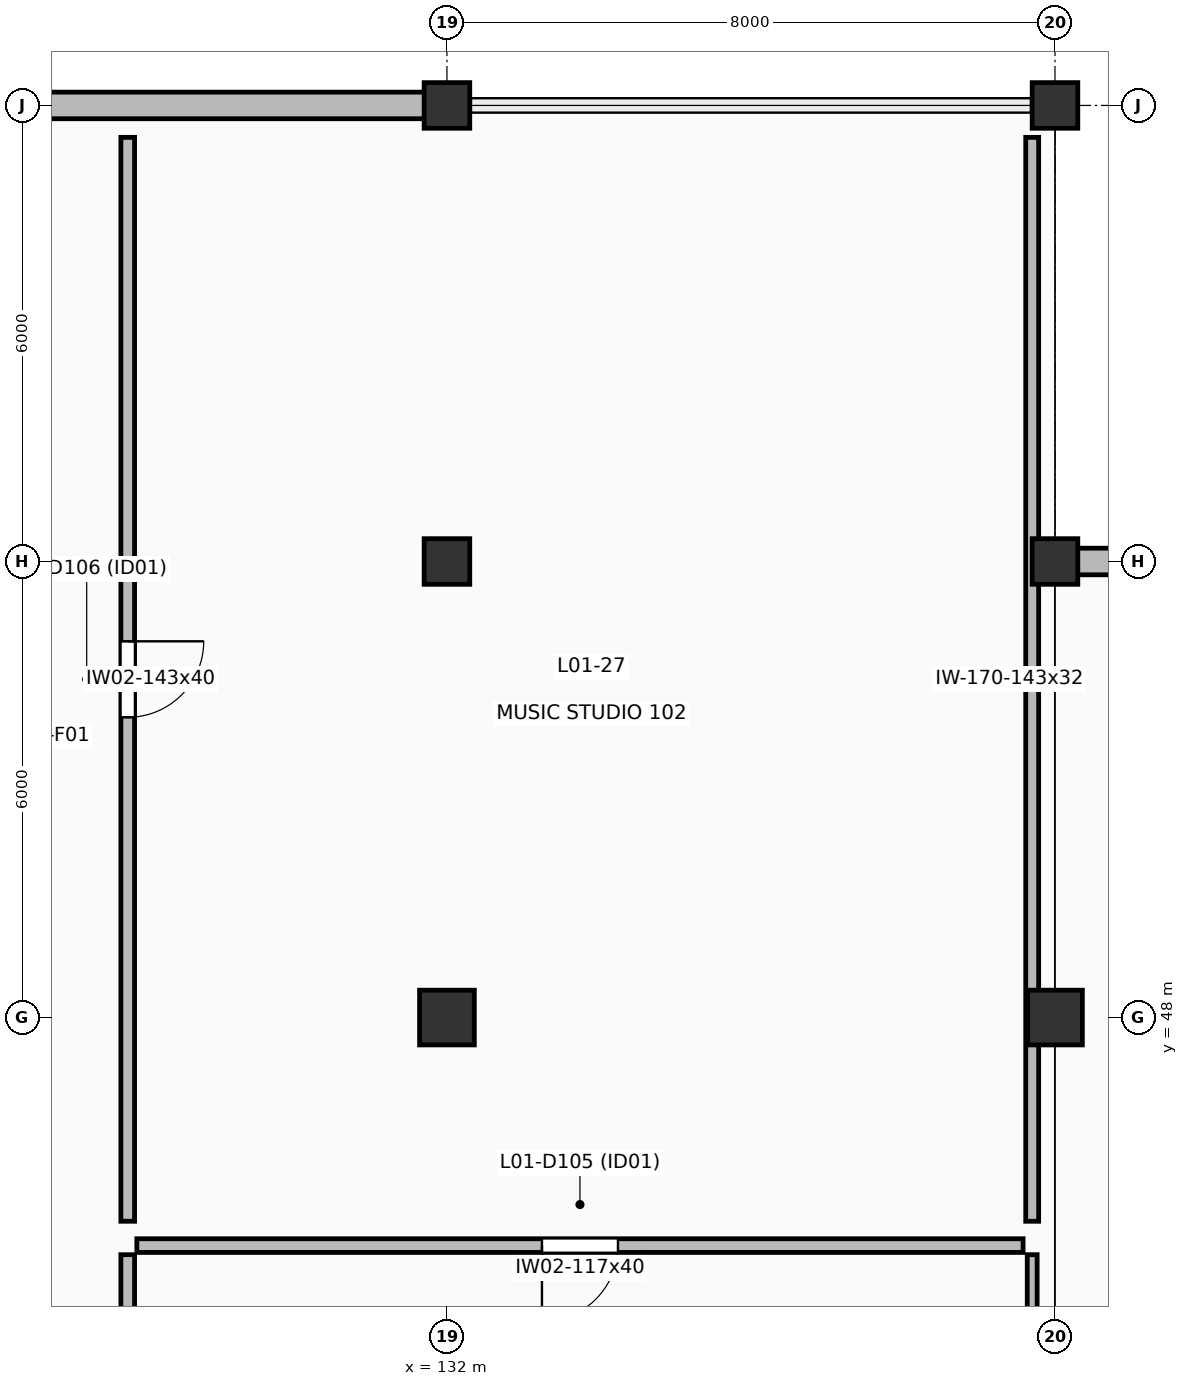
"""IFC4 building model, lengths in metres.
Left out: names, types, materials, properties, quantities, classifications, styles, units other than length and angle.
Written with IfcOpenShell. Run it as: python <this file> out.ifc"""

import sys

from ifc_helpers import new_model, si_unit, direction, frame, frame_2d, origin, origin_2d, place, context, subcontext, project, spatial, rectangle, extrude, element, fill, save


model = new_model("IFC4")
c1 = context("Model", 3, precision=1e-05, world=origin(), true_north=direction((0.0, 1.0)))
c2 = subcontext(c1, "Body", "Model", "MODEL_VIEW")
j1 = project(units=[si_unit("LENGTHUNIT", "METRE"), si_unit("PLANEANGLEUNIT", "RADIAN")], contexts=[c1])
p1 = place(None, origin())
s1 = spatial("IfcSite", under=j1, at=p1, CompositionType="ELEMENT")
p2 = place(p1, origin())
s2 = spatial("IfcBuilding", under=s1, at=p2, CompositionType="ELEMENT")
p3 = place(p2, frame((0.0, 0.0, 5.4)))
s3 = spatial("IfcBuildingStorey", under=s2, at=p3, CompositionType="ELEMENT", Elevation=5.4)
p4 = place(p3, frame((132.0, 48.0, 0.0), z_axis=(0.0, 0.0, 1.0), x_axis=(1.0, 0.0, 0.0)))
e1 = element("IfcColumn", 1, at=p4, inside=s3, PredefinedType="COLUMN", context=c2, shape_type="SweptSolid", body=[
    extrude(rectangle(XDim=0.72, YDim=0.72, at=origin_2d()), origin(), (0.0, 0.0, 1.0), 4.2),
])
for number, where, z_axis, x_axis in (
    (2, (132.0, 54.0, 0.0), (0.0, 0.0, 1.0), (1.0, 0.0, 0.0)),
    (3, (132.0, 60.0, 0.0), (0.0, 0.0, 1.0), (1.0, 0.0, 0.0)),
):
    element("IfcColumn", number, at=place(p3, frame(where, z_axis=z_axis, x_axis=x_axis)), inside=s3, PredefinedType="COLUMN", context=c2, shape_type="SweptSolid", body=[
        extrude(rectangle(XDim=0.6, YDim=0.6, at=origin_2d()), origin(), (0.0, 0.0, 1.0), 4.2),
    ])
p5 = place(p3, frame((140.0, 48.0, 0.0), z_axis=(0.0, 0.0, 1.0), x_axis=(1.0, 0.0, 0.0)))
e4 = element("IfcColumn", 4, at=p5, inside=s3, PredefinedType="COLUMN", context=c2, shape_type="SweptSolid", body=[
    extrude(rectangle(XDim=0.72, YDim=0.72, at=origin_2d()), origin(), (0.0, 0.0, 1.0), 4.2),
])
for number, where, z_axis, x_axis in (
    (5, (140.0, 54.0, 0.0), (0.0, 0.0, 1.0), (1.0, 0.0, 0.0)),
    (6, (140.0, 60.0, 0.0), (0.0, 0.0, 1.0), (1.0, 0.0, 0.0)),
):
    element("IfcColumn", number, at=place(p3, frame(where, z_axis=z_axis, x_axis=x_axis)), inside=s3, PredefinedType="COLUMN", context=c2, shape_type="SweptSolid", body=[
        extrude(rectangle(XDim=0.6, YDim=0.6, at=origin_2d()), origin(), (0.0, 0.0, 1.0), 4.2),
    ])
p6 = place(p3, frame((124.0, 60.0, 0.0), z_axis=(0.0, 0.0, 1.0), x_axis=(1.0, 0.0, 0.0)))
e7 = element("IfcWall", 7, at=p6, inside=s3, PredefinedType="SOLIDWALL", context=c2, shape_type="SweptSolid", body=[
    extrude(rectangle(XDim=8.0, YDim=0.35, at=frame_2d((4.0, 0.0))), origin(), (0.0, 0.0, 1.0), 3.165),
])
p7 = place(p3, frame((140.0, 54.0, 0.0), z_axis=(0.0, 0.0, 1.0), x_axis=(1.0, 0.0, 0.0)))
e8 = element("IfcWall", 8, at=p7, inside=s3, PredefinedType="SOLIDWALL", context=c2, shape_type="SweptSolid", body=[
    extrude(rectangle(XDim=7.0, YDim=0.35, at=frame_2d((3.5, 0.0))), origin(), (0.0, 0.0, 1.0), 3.135),
])
p8 = place(p3, frame((139.58, 45.0, 0.0), z_axis=(0.0, 0.0, 1.0), x_axis=(-1.0, 0.0, 0.0)))
e9 = element("IfcWall", 9, at=p8, inside=s3, PredefinedType="PARTITIONING", context=c2, shape_type="SweptSolid", body=[
    extrude(rectangle(XDim=11.66, YDim=0.18, at=frame_2d((5.83, 0.0))), origin(), (0.0, 0.0, 1.0), 3.98),
])
p9 = place(p8, frame((5.33, 0.0, 0.0)))
e10 = element("IfcOpeningElement", 10, at=p9, cuts=e9, PredefinedType="OPENING", context=c2, shape_type="SweptSolid", body=[
    extrude(rectangle(XDim=1.0, YDim=2.15, at=frame_2d((0.5, 1.075))), frame((0.0, 0.1, 0.0), z_axis=(0.0, -1.0, 0.0), x_axis=(1.0, 0.0, 0.0)), (0.0, 0.0, 1.0), 0.2),
])
p10 = place(p3, frame((127.8, 44.88, 0.0), z_axis=(0.0, 0.0, 1.0), x_axis=(0.0, -1.0, 0.0)))
e11 = element("IfcWall", 11, at=p10, inside=s3, PredefinedType="PARTITIONING", context=c2, shape_type="SweptSolid", body=[
    extrude(rectangle(XDim=14.46, YDim=0.18, at=frame_2d((7.23, 0.0))), origin(), (0.0, 0.0, 1.0), 3.98),
])
p11 = place(p3, frame((139.7, 30.42, 0.0), z_axis=(0.0, 0.0, 1.0), x_axis=(0.0, 1.0, 0.0)))
e12 = element("IfcWall", 12, at=p11, inside=s3, PredefinedType="PARTITIONING", context=c2, shape_type="SweptSolid", body=[
    extrude(rectangle(XDim=14.46, YDim=0.13, at=frame_2d((7.23, 0.0))), origin(), (0.0, 0.0, 1.0), 3.245),
])
p12 = place(p3, frame((127.8, 59.58, 0.0), z_axis=(0.0, 0.0, 1.0), x_axis=(0.0, -1.0, 0.0)))
e13 = element("IfcWall", 13, at=p12, inside=s3, PredefinedType="PARTITIONING", context=c2, shape_type="SweptSolid", body=[
    extrude(rectangle(XDim=14.26, YDim=0.18, at=frame_2d((7.13, 0.0))), origin(), (0.0, 0.0, 1.0), 3.98),
])
p13 = place(p12, frame((6.63, 0.0, 0.0)))
e14 = element("IfcOpeningElement", 14, at=p13, cuts=e13, PredefinedType="OPENING", context=c2, shape_type="SweptSolid", body=[
    extrude(rectangle(XDim=1.0, YDim=2.15, at=frame_2d((0.5, 1.075))), frame((0.0, 0.1, 0.0), z_axis=(0.0, -1.0, 0.0), x_axis=(1.0, 0.0, 0.0)), (0.0, 0.0, 1.0), 0.2),
])
p14 = place(p3, frame((139.7, 45.32, 0.0), z_axis=(0.0, 0.0, 1.0), x_axis=(0.0, 1.0, 0.0)))
e15 = element("IfcWall", 15, at=p14, inside=s3, PredefinedType="PARTITIONING", context=c2, shape_type="SweptSolid", body=[
    extrude(rectangle(XDim=14.26, YDim=0.17, at=frame_2d((7.13, 0.0))), origin(), (0.0, 0.0, 1.0), 3.245),
])
p15 = place(p9, origin())
e16 = element("IfcDoor", 16, at=p15, inside=s3, OperationType="SINGLE_SWING_RIGHT", PredefinedType="DOOR", context=c2, shape_type="SweptSolid", body=[
    extrude(rectangle(XDim=1.0, YDim=2.15, at=frame_2d((0.5, 1.075))), frame((0.0, 0.025, 0.0), z_axis=(0.0, -1.0, 0.0), x_axis=(1.0, 0.0, 0.0)), (0.0, 0.0, 1.0), 0.05),
])
fill(e10, e16)
p16 = place(p13, origin())
e17 = element("IfcDoor", 17, at=p16, inside=s3, OperationType="SINGLE_SWING_LEFT", PredefinedType="DOOR", context=c2, shape_type="SweptSolid", body=[
    extrude(rectangle(XDim=1.0, YDim=2.15, at=frame_2d((0.5, 1.075))), frame((0.0, 0.025, 0.0), z_axis=(0.0, -1.0, 0.0), x_axis=(1.0, 0.0, 0.0)), (0.0, 0.0, 1.0), 0.05),
])
fill(e14, e17)
save(model, sys.argv[1])
